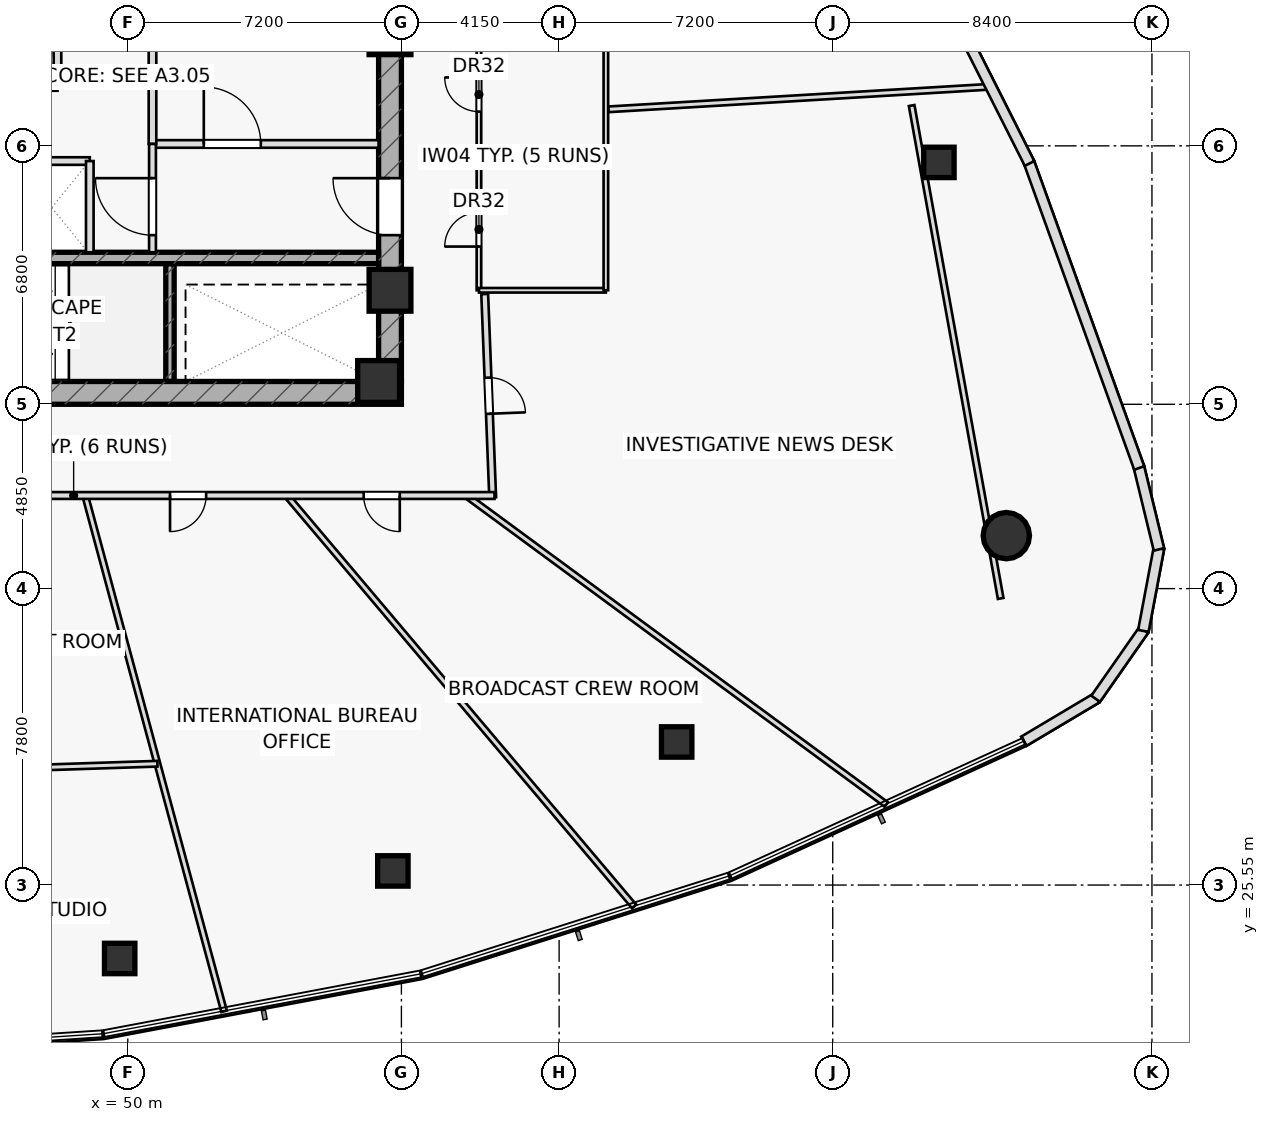
"""IFC4 building model, lengths in metres.
Left out: names, types, materials, properties, quantities, classifications, styles, units other than length and angle.
Written with IfcOpenShell. Run it as: python <this file> out.ifc"""

import sys

from ifc_helpers import new_model, si_unit, direction, frame, frame_2d, origin, origin_2d, place, context, subcontext, project, spatial, rectangle, hollow_rectangle, hollow_circle, extrude, element, fill, save


model = new_model("IFC4")
c1 = context("Model", 3, precision=1e-05, world=origin(), true_north=direction((0.0, 1.0)))
c2 = subcontext(c1, "Body", "Model", "MODEL_VIEW")
j1 = project(units=[si_unit("LENGTHUNIT", "METRE"), si_unit("PLANEANGLEUNIT", "RADIAN")], contexts=[c1])
p1 = place(None, origin())
s1 = spatial("IfcSite", under=j1, at=p1, CompositionType="ELEMENT")
p2 = place(p1, origin())
s2 = spatial("IfcBuilding", under=s1, at=p2, CompositionType="ELEMENT")
p3 = place(p2, frame((0.0, 0.0, 54.9)))
s3 = spatial("IfcBuildingStorey", under=s2, at=p3, CompositionType="ELEMENT", Elevation=54.9)
p4 = place(p3, frame((51.11, 38.8, 0.0), z_axis=(0.0, 0.0, 1.0), x_axis=(0.0, 1.0, 0.0)))
e1 = element("IfcWall", 1, at=p4, inside=s3, PredefinedType="SHEAR", context=c2, shape_type="SweptSolid", body=[
    extrude(rectangle(XDim=3.1, YDim=0.22, at=frame_2d((1.55, 0.0))), origin(), (0.0, 0.0, 1.0), 3.6),
])
p5 = place(p3, frame((42.8, 38.5, 0.0), z_axis=(0.0, 0.0, 1.0), x_axis=(1.0, 0.0, 0.0)))
e2 = element("IfcWall", 2, at=p5, inside=s3, PredefinedType="SHEAR", context=c2, shape_type="SweptSolid", body=[
    extrude(rectangle(XDim=14.4, YDim=0.6, at=frame_2d((7.2, 0.0))), origin(), (0.0, 0.0, 1.0), 3.6),
])
p6 = place(p5, frame((0.88, 0.0, 0.0)))
e3 = element("IfcOpeningElement", 3, at=p6, cuts=e2, PredefinedType="OPENING", context=c2, shape_type="SweptSolid", body=[
    extrude(rectangle(XDim=1.05, YDim=2.2, at=frame_2d((0.525, 1.1))), frame((0.0, 0.31, 0.0), z_axis=(0.0, -1.0, 0.0), x_axis=(1.0, 0.0, 0.0)), (0.0, 0.0, 1.0), 0.62),
])
p7 = place(p3, frame((56.9, 38.8, 0.0), z_axis=(0.0, 0.0, 1.0), x_axis=(0.0, 1.0, 0.0)))
e4 = element("IfcWall", 4, at=p7, inside=s3, PredefinedType="SHEAR", context=c2, shape_type="SweptSolid", body=[
    extrude(rectangle(XDim=12.4, YDim=0.6, at=frame_2d((6.2, 0.0))), origin(), (0.0, 0.0, 1.0), 3.6),
])
p8 = place(p7, frame((3.85, 0.0, 0.0)))
e5 = element("IfcOpeningElement", 5, at=p8, cuts=e4, PredefinedType="OPENING", context=c2, shape_type="SweptSolid", body=[
    extrude(rectangle(XDim=1.5, YDim=2.2, at=frame_2d((0.75, 1.1))), frame((0.0, 0.31, 0.0), z_axis=(0.0, -1.0, 0.0), x_axis=(1.0, 0.0, 0.0)), (0.0, 0.0, 1.0), 0.62),
])
p9 = place(p3, frame((43.4, 42.05, 0.0), z_axis=(0.0, 0.0, 1.0), x_axis=(1.0, 0.0, 0.0)))
e6 = element("IfcWall", 6, at=p9, inside=s3, PredefinedType="SHEAR", context=c2, shape_type="SweptSolid", body=[
    extrude(rectangle(XDim=13.2, YDim=0.3, at=frame_2d((6.6, 0.0))), origin(), (0.0, 0.0, 1.0), 3.6),
])
for number, where, z_axis, x_axis in (
    (7, (56.9, 47.95, 0.0), (0.0, 0.0, 1.0), (1.0, 0.0, 0.0)),
    (8, (56.9, 41.2, 0.0), (0.0, 0.0, 1.0), (1.0, 0.0, 0.0)),
    (9, (56.6, 38.8, 0.0), (0.0, 0.0, 1.0), (1.0, 0.0, 0.0)),
):
    element("IfcColumn", number, at=place(p3, frame(where, z_axis=z_axis, x_axis=x_axis)), inside=s3, PredefinedType="COLUMN", context=c2, shape_type="SweptSolid", body=[
        extrude(rectangle(XDim=1.1, YDim=1.1, at=origin_2d()), origin(), (0.0, 0.0, 1.0), 3.6),
    ])
for number, where, z_axis, x_axis in (
    (10, (49.787, 23.618, 0.0), (0.0, 0.0, 1.0), (1.0, 0.0, 0.0)),
    (11, (56.975, 25.921, 0.0), (0.0, 0.0, 1.0), (1.0, 0.0, 0.0)),
    (12, (64.444, 29.315, 0.0), (0.0, 0.0, 1.0), (1.0, 0.0, 0.0)),
):
    element("IfcColumn", number, at=place(p3, frame(where, z_axis=z_axis, x_axis=x_axis)), inside=s3, PredefinedType="COLUMN", context=c2, shape_type="SweptSolid", body=[
        extrude(hollow_rectangle(XDim=0.8, YDim=0.8, WallThickness=0.045, at=origin_2d()), origin(), (0.0, 0.0, 1.0), 3.6),
    ])
p10 = place(p3, frame((73.118, 34.744, 0.0), z_axis=(0.0, 0.0, 1.0), x_axis=(1.0, 0.0, 0.0)))
e13 = element("IfcColumn", 13, at=p10, inside=s3, PredefinedType="COLUMN", context=c2, shape_type="SweptSolid", body=[
    extrude(hollow_circle(Radius=0.61, WallThickness=0.05, at=origin_2d()), origin(), (0.0, 0.0, 1.0), 3.6),
])
p11 = place(p3, frame((71.344, 44.565, 0.0), z_axis=(0.0, 0.0, 1.0), x_axis=(1.0, 0.0, 0.0)))
e14 = element("IfcColumn", 14, at=p11, inside=s3, PredefinedType="COLUMN", context=c2, shape_type="SweptSolid", body=[
    extrude(hollow_rectangle(XDim=0.8, YDim=0.8, WallThickness=0.045, at=origin_2d()), origin(), (0.0, 0.0, 1.0), 3.6),
])
p12 = place(p3, frame((45.75, 46.55, 0.0), z_axis=(0.0, 0.0, 1.0), x_axis=(1.0, 0.0, 0.0)))
e15 = element("IfcWall", 15, at=p12, inside=s3, PredefinedType="PARTITIONING", context=c2, shape_type="SweptSolid", body=[
    extrude(rectangle(XDim=2.4, YDim=0.2, at=frame_2d((1.2, 0.0))), origin(), (0.0, 0.0, 1.0), 3.6),
])
p13 = place(p3, frame((48.15, 46.55, 0.0), z_axis=(0.0, 0.0, 1.0), x_axis=(0.0, 1.0, 0.0)))
e16 = element("IfcWall", 16, at=p13, inside=s3, PredefinedType="PARTITIONING", context=c2, shape_type="SweptSolid", body=[
    extrude(rectangle(XDim=1.25, YDim=0.2, at=frame_2d((0.625, 0.0))), origin(), (0.0, 0.0, 1.0), 3.6),
])
p14 = place(p3, frame((46.95, 44.6, 0.0), z_axis=(0.0, 0.0, 1.0), x_axis=(1.0, 0.0, 0.0)))
e17 = element("IfcWall", 17, at=p14, inside=s3, PredefinedType="PARTITIONING", context=c2, shape_type="SweptSolid", body=[
    extrude(rectangle(XDim=2.05, YDim=0.2, at=frame_2d((1.025, 0.0))), origin(), (0.0, 0.0, 1.0), 3.6),
])
p15 = place(p3, frame((50.65, 45.05, 0.0), z_axis=(0.0, 0.0, 1.0), x_axis=(1.0, 0.0, 0.0)))
e18 = element("IfcWall", 18, at=p15, inside=s3, PredefinedType="PARTITIONING", context=c2, shape_type="SweptSolid", body=[
    extrude(rectangle(XDim=5.95, YDim=0.2, at=frame_2d((2.975, 0.0))), origin(), (0.0, 0.0, 1.0), 3.6),
])
p16 = place(p15, frame((1.35, 0.0, 0.0)))
e19 = element("IfcOpeningElement", 19, at=p16, cuts=e18, PredefinedType="OPENING", context=c2, shape_type="SweptSolid", body=[
    extrude(rectangle(XDim=1.5, YDim=2.2, at=frame_2d((0.75, 1.1))), frame((0.0, 0.11, 0.0), z_axis=(0.0, -1.0, 0.0), x_axis=(1.0, 0.0, 0.0)), (0.0, 0.0, 1.0), 0.22),
])
p17 = place(p3, frame((50.65, 45.05, 0.0), z_axis=(0.0, 0.0, 1.0), x_axis=(0.0, 1.0, 0.0)))
e20 = element("IfcWall", 20, at=p17, inside=s3, PredefinedType="PARTITIONING", context=c2, shape_type="SweptSolid", body=[
    extrude(rectangle(XDim=2.75, YDim=0.2, at=frame_2d((1.375, 0.0))), origin(), (0.0, 0.0, 1.0), 3.6),
])
p18 = place(p3, frame((50.65, 42.2, 0.0), z_axis=(0.0, 0.0, 1.0), x_axis=(0.0, 1.0, 0.0)))
e21 = element("IfcWall", 21, at=p18, inside=s3, PredefinedType="PARTITIONING", context=c2, shape_type="SweptSolid", body=[
    extrude(rectangle(XDim=2.85, YDim=0.18, at=frame_2d((1.425, 0.0))), origin(), (0.0, 0.0, 1.0), 3.6),
])
p19 = place(p18, frame((0.45, 0.0, 0.0)))
e22 = element("IfcOpeningElement", 22, at=p19, cuts=e21, PredefinedType="OPENING", context=c2, shape_type="SweptSolid", body=[
    extrude(rectangle(XDim=1.5, YDim=2.2, at=frame_2d((0.75, 1.1))), frame((0.0, 0.1, 0.0), z_axis=(0.0, -1.0, 0.0), x_axis=(1.0, 0.0, 0.0)), (0.0, 0.0, 1.0), 0.2),
])
p20 = place(p3, frame((72.969, 33.091, 0.0), z_axis=(0.0, 0.0, 1.0), x_axis=(-0.177742578179, 0.984077017261, 0.0)))
e23 = element("IfcWall", 23, at=p20, inside=s3, PredefinedType="PARTITIONING", context=c2, shape_type="SweptSolid", body=[
    extrude(rectangle(XDim=13.179, YDim=0.15, at=frame_2d((6.59, 0.0))), origin(), (0.0, 0.0, 1.0), 2.925),
])
p21 = place(p3, frame((59.24, 41.2, 0.0), z_axis=(0.0, 0.0, 1.0), x_axis=(0.0, 1.0, 0.0)))
e24 = element("IfcWall", 24, at=p21, inside=s3, PredefinedType="PARTITIONING", context=c2, shape_type="SweptSolid", body=[
    extrude(rectangle(XDim=7.0, YDim=0.12, at=frame_2d((3.5, 0.0))), origin(), (0.0, 0.0, 1.0), 3.6),
])
p22 = place(p21, frame((1.15, 0.0, 0.0)))
e25 = element("IfcOpeningElement", 25, at=p22, cuts=e24, PredefinedType="OPENING", context=c2, shape_type="SweptSolid", body=[
    extrude(rectangle(XDim=0.9, YDim=2.05, at=frame_2d((0.45, 1.025))), frame((0.0, 0.07, 0.0), z_axis=(0.0, -1.0, 0.0), x_axis=(1.0, 0.0, 0.0)), (0.0, 0.0, 1.0), 0.14),
])
p23 = place(p21, frame((4.7, 0.0, 0.0)))
e26 = element("IfcOpeningElement", 26, at=p23, cuts=e24, PredefinedType="OPENING", context=c2, shape_type="SweptSolid", body=[
    extrude(rectangle(XDim=0.9, YDim=2.05, at=frame_2d((0.45, 1.025))), frame((0.0, 0.07, 0.0), z_axis=(0.0, -1.0, 0.0), x_axis=(1.0, 0.0, 0.0)), (0.0, 0.0, 1.0), 0.14),
])
p24 = place(p3, frame((59.24, 41.2, 0.0), z_axis=(0.0, 0.0, 1.0), x_axis=(1.0, 0.0, 0.0)))
e27 = element("IfcWall", 27, at=p24, inside=s3, PredefinedType="PARTITIONING", context=c2, shape_type="SweptSolid", body=[
    extrude(rectangle(XDim=3.34, YDim=0.12, at=frame_2d((1.67, 0.0))), origin(), (0.0, 0.0, 1.0), 2.925),
])
p25 = place(p3, frame((59.24, 44.65, 0.0), z_axis=(0.0, 0.0, 1.0), x_axis=(1.0, 0.0, 0.0)))
e28 = element("IfcWall", 28, at=p25, inside=s3, PredefinedType="PARTITIONING", context=c2, shape_type="SweptSolid", body=[
    extrude(rectangle(XDim=3.34, YDim=0.12, at=frame_2d((1.67, 0.0))), origin(), (0.0, 0.0, 1.0), 3.6),
])
p26 = place(p3, frame((62.58, 41.2, 0.0), z_axis=(0.0, 0.0, 1.0), x_axis=(0.0, 1.0, 0.0)))
e29 = element("IfcWall", 29, at=p26, inside=s3, PredefinedType="PARTITIONING", context=c2, shape_type="SweptSolid", body=[
    extrude(rectangle(XDim=7.0, YDim=0.12, at=frame_2d((3.5, 0.0))), origin(), (0.0, 0.0, 1.0), 3.6),
])
p27 = place(p3, frame((48.878, 35.8, 0.0), z_axis=(0.0, 0.0, 1.0), x_axis=(0.260097424476, -0.965582378558, 0.0)))
e30 = element("IfcWall", 30, at=p27, inside=s3, PredefinedType="PARTITIONING", context=c2, shape_type="SweptSolid", body=[
    extrude(rectangle(XDim=14.056, YDim=0.15, at=frame_2d((7.028, 0.0))), origin(), (0.0, 0.0, 1.0), 2.975),
])
p28 = place(p3, frame((54.18, 35.8, 0.0), z_axis=(0.0, 0.0, 1.0), x_axis=(0.645718892339, -0.763575217039, 0.0)))
e31 = element("IfcWall", 31, at=p28, inside=s3, PredefinedType="PARTITIONING", context=c2, shape_type="SweptSolid", body=[
    extrude(rectangle(XDim=14.163, YDim=0.15, at=frame_2d((7.082, 0.0))), origin(), (0.0, 0.0, 1.0), 2.925),
])
p29 = place(p3, frame((58.906, 35.8, 0.0), z_axis=(0.0, 0.0, 1.0), x_axis=(0.80551038612, -0.592581655008, 0.0)))
e32 = element("IfcWall", 32, at=p29, inside=s3, PredefinedType="PARTITIONING", context=c2, shape_type="SweptSolid", body=[
    extrude(rectangle(XDim=13.722, YDim=0.15, at=frame_2d((6.861, 0.0))), origin(), (0.0, 0.0, 1.0), 2.925),
])
p30 = place(p3, frame((62.65, 45.961, 0.0), z_axis=(0.0, 0.0, 1.0), x_axis=(0.998256468531, 0.059025613391, 0.0)))
e33 = element("IfcWall", 33, at=p30, inside=s3, PredefinedType="PARTITIONING", context=c2, shape_type="SweptSolid", body=[
    extrude(rectangle(XDim=10.088, YDim=0.15, at=frame_2d((5.044, 0.0))), origin(), (0.0, 0.0, 1.0), 2.975),
])
p31 = place(p3, frame((38.053, 28.326, 0.0), z_axis=(0.0, 0.0, 1.0), x_axis=(0.999465503327, 0.032691094503, 0.0)))
e34 = element("IfcWall", 34, at=p31, inside=s3, PredefinedType="PARTITIONING", context=c2, shape_type="SweptSolid", body=[
    extrude(rectangle(XDim=12.733, YDim=0.15, at=frame_2d((6.367, 0.0))), origin(), (0.0, 0.0, 1.0), 2.925),
])
p32 = place(p31, frame((5.892, 0.0, 0.0)))
e35 = element("IfcOpeningElement", 35, at=p32, cuts=e34, PredefinedType="OPENING", context=c2, shape_type="SweptSolid", body=[
    extrude(rectangle(XDim=0.95, YDim=2.05, at=frame_2d((0.475, 1.025))), frame((0.0, 0.085, 0.0), z_axis=(0.0, -1.0, 0.0), x_axis=(1.0, 0.0, 0.0)), (0.0, 0.0, 1.0), 0.17),
])
p33 = place(p3, frame((59.392, 41.1, 0.0), z_axis=(0.0, 0.0, 1.0), x_axis=(0.03921413315, -0.999230830069, 0.0)))
e36 = element("IfcWall", 36, at=p33, inside=s3, PredefinedType="PARTITIONING", context=c2, shape_type="SweptSolid", body=[
    extrude(rectangle(XDim=5.354, YDim=0.18, at=frame_2d((2.677, 0.0))), origin(), (0.0, 0.0, 1.0), 2.925),
])
p34 = place(p33, frame((2.202, 0.0, 0.0)))
e37 = element("IfcOpeningElement", 37, at=p34, cuts=e36, PredefinedType="OPENING", context=c2, shape_type="SweptSolid", body=[
    extrude(rectangle(XDim=0.95, YDim=2.05, at=frame_2d((0.475, 1.025))), frame((0.0, 0.1, 0.0), z_axis=(0.0, -1.0, 0.0), x_axis=(1.0, 0.0, 0.0)), (0.0, 0.0, 1.0), 0.2),
])
p35 = place(p3, frame((59.65, 35.8, 0.0), z_axis=(0.0, 0.0, 1.0), x_axis=(-1.0, 0.0, 0.0)))
e38 = element("IfcWall", 38, at=p35, inside=s3, PredefinedType="PARTITIONING", context=c2, shape_type="SweptSolid", body=[
    extrude(rectangle(XDim=22.15, YDim=0.18, at=frame_2d((11.075, 0.0))), origin(), (0.0, 0.0, 1.0), 2.925),
])
p36 = place(p35, frame((2.493, 0.0, 0.0)))
e39 = element("IfcOpeningElement", 39, at=p36, cuts=e38, PredefinedType="OPENING", context=c2, shape_type="SweptSolid", body=[
    extrude(rectangle(XDim=0.95, YDim=2.05, at=frame_2d((0.475, 1.025))), frame((0.0, 0.1, 0.0), z_axis=(0.0, -1.0, 0.0), x_axis=(1.0, 0.0, 0.0)), (0.0, 0.0, 1.0), 0.2),
])
p37 = place(p35, frame((7.588, 0.0, 0.0)))
e40 = element("IfcOpeningElement", 40, at=p37, cuts=e38, PredefinedType="OPENING", context=c2, shape_type="SweptSolid", body=[
    extrude(rectangle(XDim=0.95, YDim=2.05, at=frame_2d((0.475, 1.025))), frame((0.0, 0.1, 0.0), z_axis=(0.0, -1.0, 0.0), x_axis=(1.0, 0.0, 0.0)), (0.0, 0.0, 1.0), 0.2),
])
p38 = place(p35, frame((13.848, 0.0, 0.0)))
e41 = element("IfcOpeningElement", 41, at=p38, cuts=e38, PredefinedType="OPENING", context=c2, shape_type="SweptSolid", body=[
    extrude(rectangle(XDim=0.95, YDim=2.05, at=frame_2d((0.475, 1.025))), frame((0.0, 0.1, 0.0), z_axis=(0.0, -1.0, 0.0), x_axis=(1.0, 0.0, 0.0)), (0.0, 0.0, 1.0), 0.2),
])
p39 = place(p3, frame((73.579, 29.334, 0.0), z_axis=(0.0, 0.0, 1.0), x_axis=(0.859405481685, 0.511294648955, 0.0)))
e42 = element("IfcWall", 42, at=p39, inside=s3, PredefinedType="STANDARD", context=c2, shape_type="SweptSolid", body=[
    extrude(rectangle(XDim=2.223, YDim=0.28, at=frame_2d((1.112, 0.0))), origin(), (0.0, 0.0, 1.0), 3.6),
])
p40 = place(p3, frame((75.469, 30.451, 0.0), z_axis=(0.0, 0.0, 1.0), x_axis=(0.572854744828, 0.819656904642, 0.0)))
e43 = element("IfcWall", 43, at=p40, inside=s3, PredefinedType="STANDARD", context=c2, shape_type="SweptSolid", body=[
    extrude(rectangle(XDim=2.212, YDim=0.28, at=frame_2d((1.106, 0.0))), origin(), (0.0, 0.0, 1.0), 3.6),
])
p41 = place(p3, frame((76.724, 32.237, 0.0), z_axis=(0.0, 0.0, 1.0), x_axis=(0.184788378339, 0.982778334738, 0.0)))
e44 = element("IfcWall", 44, at=p41, inside=s3, PredefinedType="STANDARD", context=c2, shape_type="SweptSolid", body=[
    extrude(rectangle(XDim=2.212, YDim=0.28, at=frame_2d((1.106, 0.0))), origin(), (0.0, 0.0, 1.0), 3.6),
])
p42 = place(p3, frame((77.134, 34.381, 0.0), z_axis=(0.0, 0.0, 1.0), x_axis=(-0.23592214769, 0.971771958964, 0.0)))
e45 = element("IfcWall", 45, at=p42, inside=s3, PredefinedType="STANDARD", context=c2, shape_type="SweptSolid", body=[
    extrude(rectangle(XDim=2.234, YDim=0.28, at=frame_2d((1.117, 0.0))), origin(), (0.0, 0.0, 1.0), 3.6),
])
p43 = place(p3, frame((76.615, 36.524, 0.0), z_axis=(0.0, 0.0, 1.0), x_axis=(-0.339134131708, 0.940738029799, 0.0)))
e46 = element("IfcWall", 46, at=p43, inside=s3, PredefinedType="STANDARD", context=c2, shape_type="SweptSolid", body=[
    extrude(rectangle(XDim=8.547, YDim=0.28, at=frame_2d((4.274, 0.0))), origin(), (0.0, 0.0, 1.0), 3.6),
])
p44 = place(p3, frame((73.728, 44.537, 0.0), z_axis=(0.0, 0.0, 1.0), x_axis=(-0.450471385419, 0.892790866283, 0.0)))
e47 = element("IfcWall", 47, at=p44, inside=s3, PredefinedType="STANDARD", context=c2, shape_type="SweptSolid", body=[
    extrude(rectangle(XDim=8.535, YDim=0.28, at=frame_2d((4.268, 0.0))), origin(), (0.0, 0.0, 1.0), 3.6),
])
p45 = place(p3, frame((49.0, 42.2, 0.0), z_axis=(0.0, 0.0, 1.0), x_axis=(0.0, 1.0, 0.0)))
e48 = element("IfcWall", 48, at=p45, inside=s3, PredefinedType="PARTITIONING", context=c2, shape_type="SweptSolid", body=[
    extrude(rectangle(XDim=2.4, YDim=0.2, at=frame_2d((1.2, 0.0))), origin(), (0.0, 0.0, 1.0), 3.6),
])
p46 = place(p8, origin())
e49 = element("IfcDoor", 49, at=p46, inside=s3, OperationType="SINGLE_SWING_RIGHT", PredefinedType="DOOR", context=c2, shape_type="SweptSolid", body=[
    extrude(rectangle(XDim=1.5, YDim=2.2, at=frame_2d((0.75, 1.1))), frame((0.0, 0.025, 0.0), z_axis=(0.0, -1.0, 0.0), x_axis=(1.0, 0.0, 0.0)), (0.0, 0.0, 1.0), 0.05),
])
fill(e5, e49)
p47 = place(p16, origin())
e50 = element("IfcDoor", 50, at=p47, inside=s3, OperationType="SINGLE_SWING_LEFT", PredefinedType="DOOR", context=c2, shape_type="SweptSolid", body=[
    extrude(rectangle(XDim=1.5, YDim=2.2, at=frame_2d((0.75, 1.1))), frame((0.0, 0.025, 0.0), z_axis=(0.0, -1.0, 0.0), x_axis=(1.0, 0.0, 0.0)), (0.0, 0.0, 1.0), 0.05),
])
fill(e19, e50)
p48 = place(p19, origin())
e51 = element("IfcDoor", 51, at=p48, inside=s3, OperationType="SINGLE_SWING_RIGHT", PredefinedType="DOOR", context=c2, shape_type="SweptSolid", body=[
    extrude(rectangle(XDim=1.5, YDim=2.2, at=frame_2d((0.75, 1.1))), frame((0.0, 0.025, 0.0), z_axis=(0.0, -1.0, 0.0), x_axis=(1.0, 0.0, 0.0)), (0.0, 0.0, 1.0), 0.05),
])
fill(e22, e51)
p49 = place(p22, origin())
e52 = element("IfcDoor", 52, at=p49, inside=s3, OperationType="SINGLE_SWING_LEFT", PredefinedType="DOOR", context=c2, shape_type="SweptSolid", body=[
    extrude(rectangle(XDim=0.9, YDim=2.05, at=frame_2d((0.45, 1.025))), frame((0.0, 0.025, 0.0), z_axis=(0.0, -1.0, 0.0), x_axis=(1.0, 0.0, 0.0)), (0.0, 0.0, 1.0), 0.05),
])
fill(e25, e52)
p50 = place(p23, origin())
e53 = element("IfcDoor", 53, at=p50, inside=s3, OperationType="SINGLE_SWING_RIGHT", PredefinedType="DOOR", context=c2, shape_type="SweptSolid", body=[
    extrude(rectangle(XDim=0.9, YDim=2.05, at=frame_2d((0.45, 1.025))), frame((0.0, 0.025, 0.0), z_axis=(0.0, -1.0, 0.0), x_axis=(1.0, 0.0, 0.0)), (0.0, 0.0, 1.0), 0.05),
])
fill(e26, e53)
p51 = place(p34, origin())
e54 = element("IfcDoor", 54, at=p51, inside=s3, OperationType="SINGLE_SWING_RIGHT", PredefinedType="DOOR", context=c2, shape_type="SweptSolid", body=[
    extrude(rectangle(XDim=0.95, YDim=2.05, at=frame_2d((0.475, 1.025))), frame((0.0, 0.025, 0.0), z_axis=(0.0, -1.0, 0.0), x_axis=(1.0, 0.0, 0.0)), (0.0, 0.0, 1.0), 0.05),
])
fill(e37, e54)
p52 = place(p36, origin())
e55 = element("IfcDoor", 55, at=p52, inside=s3, OperationType="SINGLE_SWING_LEFT", PredefinedType="DOOR", context=c2, shape_type="SweptSolid", body=[
    extrude(rectangle(XDim=0.95, YDim=2.05, at=frame_2d((0.475, 1.025))), frame((0.0, 0.025, 0.0), z_axis=(0.0, -1.0, 0.0), x_axis=(1.0, 0.0, 0.0)), (0.0, 0.0, 1.0), 0.05),
])
fill(e39, e55)
p53 = place(p37, origin())
e56 = element("IfcDoor", 56, at=p53, inside=s3, OperationType="SINGLE_SWING_RIGHT", PredefinedType="DOOR", context=c2, shape_type="SweptSolid", body=[
    extrude(rectangle(XDim=0.95, YDim=2.05, at=frame_2d((0.475, 1.025))), frame((0.0, 0.025, 0.0), z_axis=(0.0, -1.0, 0.0), x_axis=(1.0, 0.0, 0.0)), (0.0, 0.0, 1.0), 0.05),
])
fill(e40, e56)
save(model, sys.argv[1])
